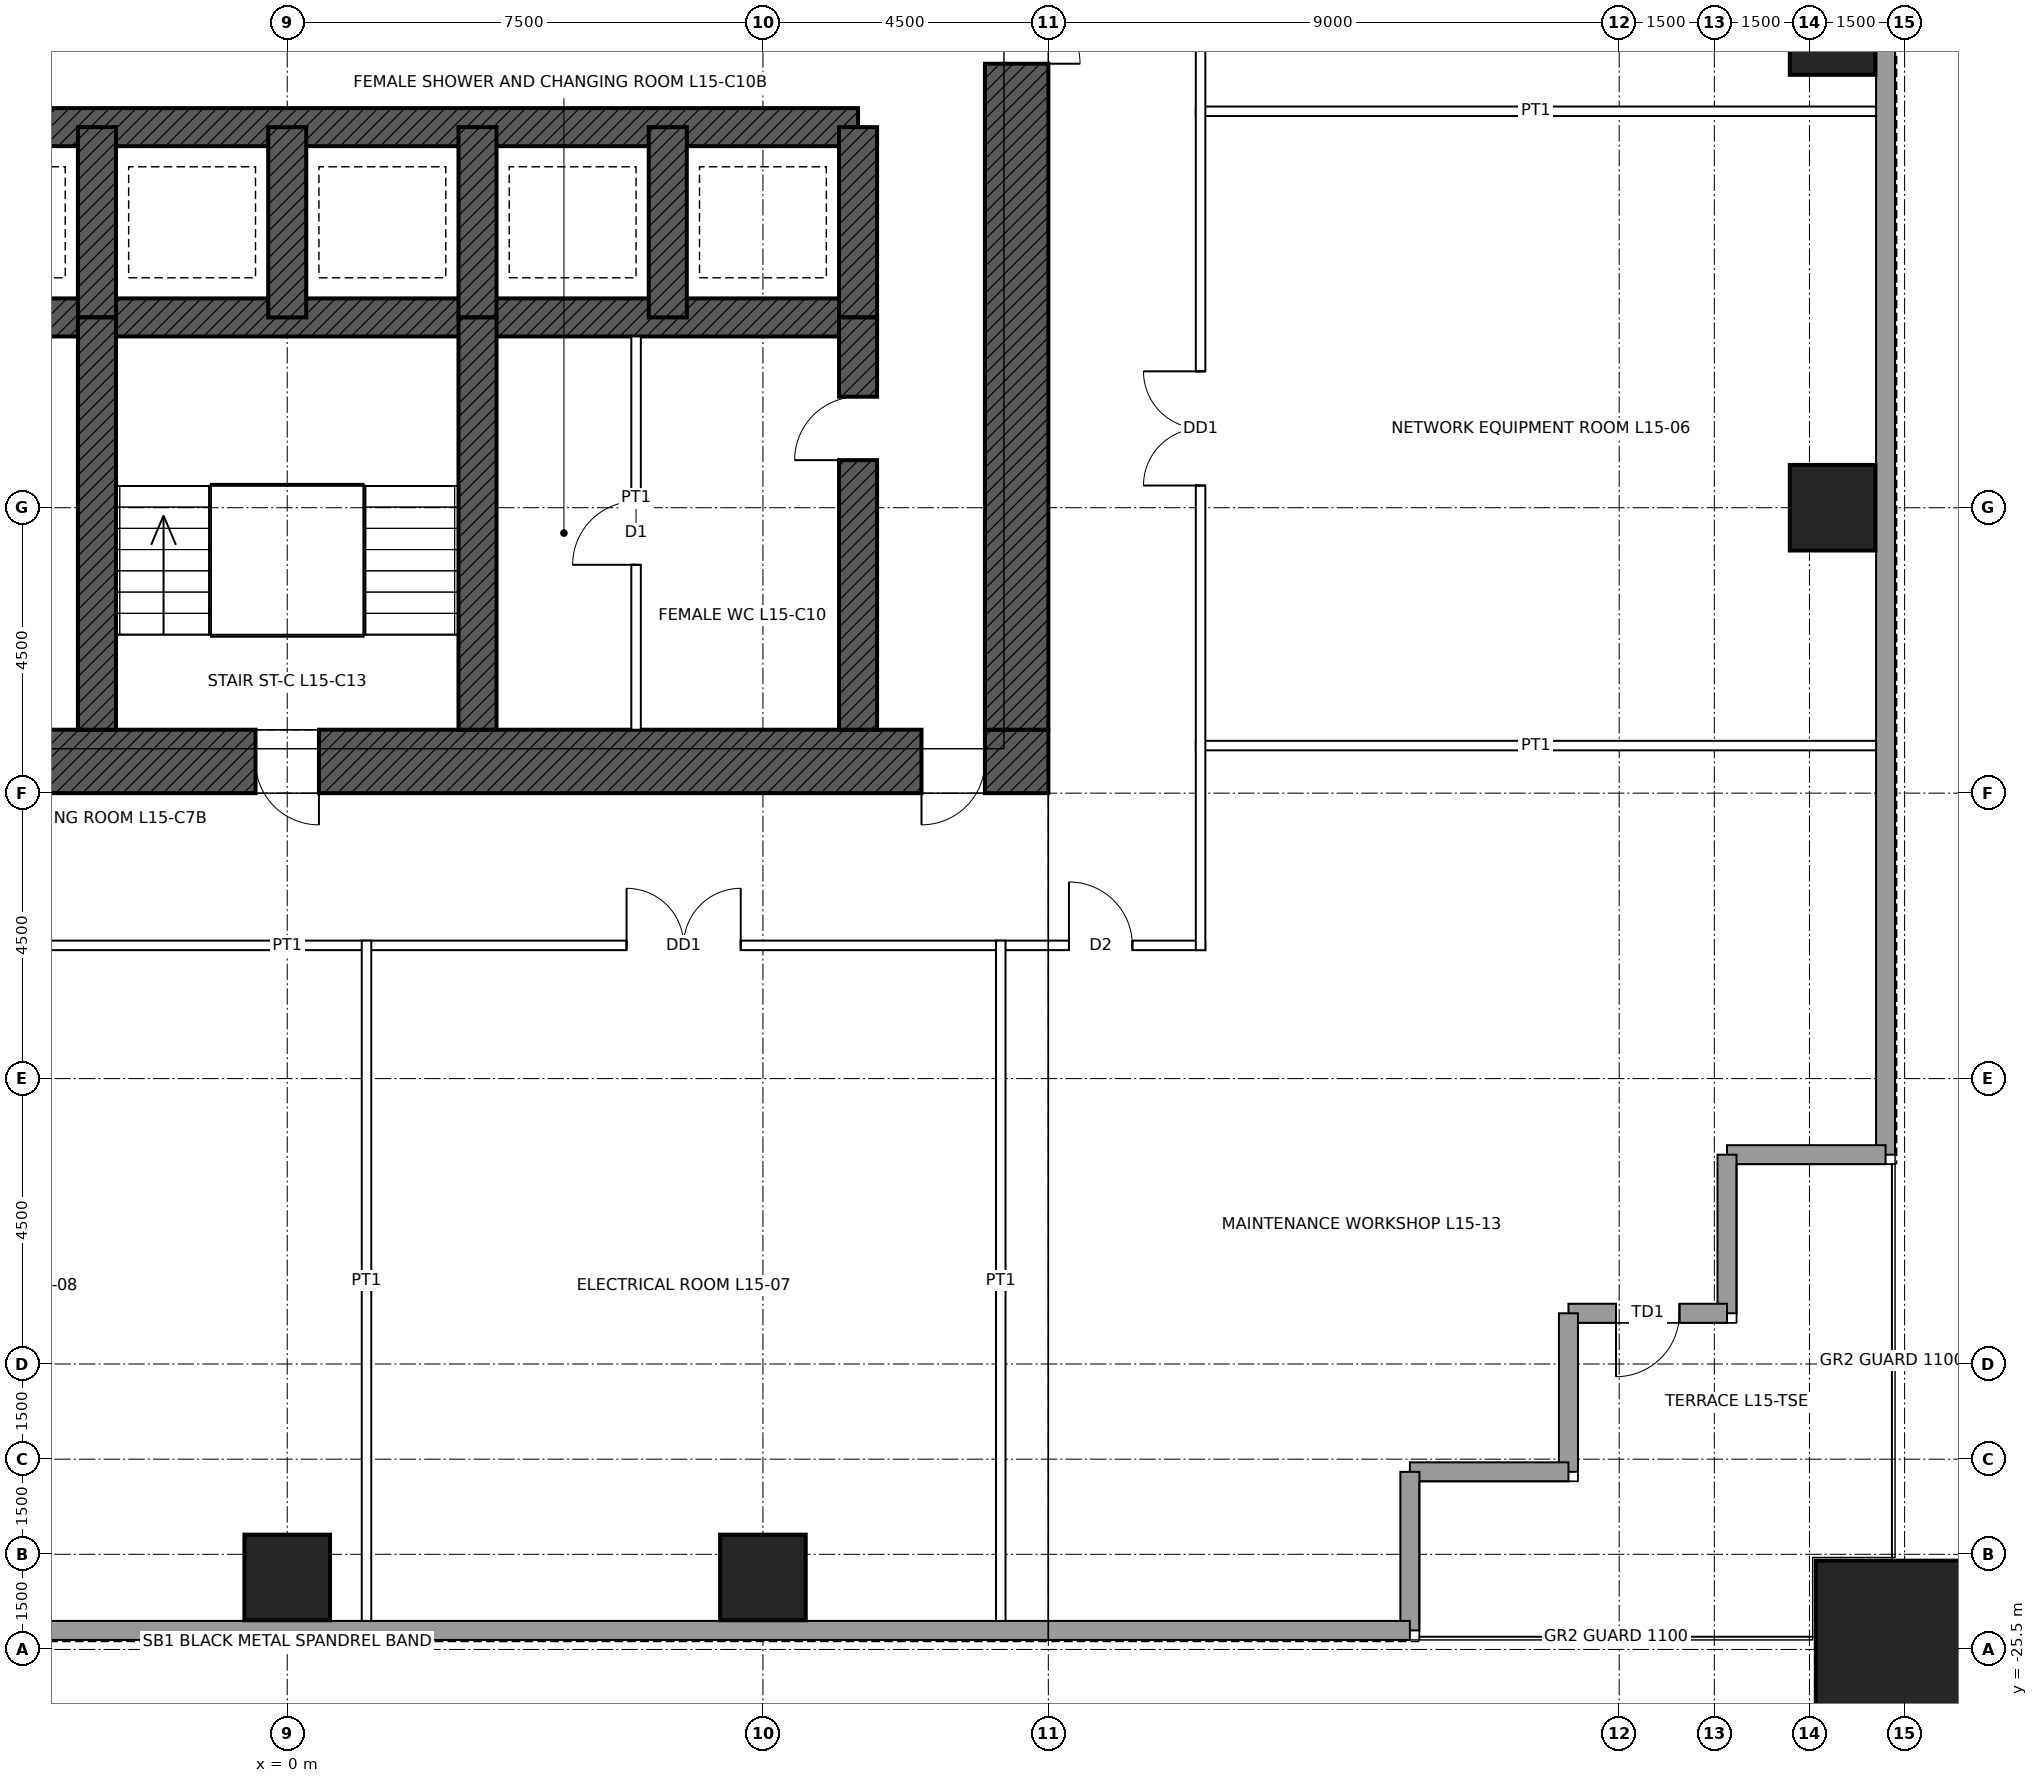
"""IFC4 building model, lengths in metres.
Left out: names, types, materials, properties, quantities, classifications, styles, units other than length and angle.
Written with IfcOpenShell. Run it as: python <this file> out.ifc"""

import sys

from ifc_helpers import new_model, si_unit, direction, frame, frame_2d, origin, origin_2d, place, context, subcontext, project, spatial, rectangle, hollow_rectangle, extrude, element, fill, save


model = new_model("IFC4")
c1 = context("Model", 3, precision=1e-05, world=origin(), true_north=direction((0.0, 1.0)))
c2 = subcontext(c1, "Body", "Model", "MODEL_VIEW")
j1 = project(units=[si_unit("LENGTHUNIT", "METRE"), si_unit("PLANEANGLEUNIT", "RADIAN")], contexts=[c1])
p1 = place(None, origin())
s1 = spatial("IfcSite", under=j1, at=p1, CompositionType="ELEMENT")
p2 = place(p1, origin())
s2 = spatial("IfcBuilding", under=s1, at=p2, CompositionType="ELEMENT")
p3 = place(p2, frame((0.0, 0.0, 78.4)))
s3 = spatial("IfcBuildingStorey", under=s2, at=p3, CompositionType="ELEMENT", Elevation=78.4)
p4 = place(p3, frame((25.5, -25.5, 0.0), z_axis=(0.0, 0.0, 1.0), x_axis=(1.0, 0.0, 0.0)))
e1 = element("IfcColumn", 1, at=p4, inside=s3, PredefinedType="COLUMN", context=c2, shape_type="SweptSolid", body=[
    extrude(hollow_rectangle(XDim=2.8, YDim=2.8, WallThickness=0.14, at=origin_2d()), origin(), (0.0, 0.0, 1.0), 5.0),
])
for number, where, z_axis, x_axis in (
    (2, (24.365, 0.0, 0.0), (0.0, 0.0, 1.0), (1.0, 0.0, 0.0)),
    (3, (24.365, -7.5, 0.0), (0.0, 0.0, 1.0), (1.0, 0.0, 0.0)),
    (4, (7.5, -24.365, 0.0), (0.0, 0.0, 1.0), (1.0, 0.0, 0.0)),
    (5, (0.0, -24.365, 0.0), (0.0, 0.0, 1.0), (1.0, 0.0, 0.0)),
):
    element("IfcColumn", number, at=place(p3, frame(where, z_axis=z_axis, x_axis=x_axis)), inside=s3, PredefinedType="COLUMN", context=c2, shape_type="SweptSolid", body=[
        extrude(hollow_rectangle(XDim=1.35, YDim=1.35, WallThickness=0.085, at=origin_2d()), origin(), (0.0, 0.0, 1.0), 5.0),
    ])
p5 = place(p3, frame((12.0, -11.5, 0.0), z_axis=(0.0, 0.0, 1.0), x_axis=(-1.0, 0.0, 0.0)))
e6 = element("IfcWall", 6, at=p5, inside=s3, PredefinedType="SHEAR", context=c2, shape_type="SweptSolid", body=[
    extrude(rectangle(XDim=24.0, YDim=1.0, at=frame_2d((12.0, 0.0))), origin(), (0.0, 0.0, 1.0), 5.0),
])
p6 = place(p5, frame((11.5, 0.0, 0.0)))
e7 = element("IfcOpeningElement", 7, at=p6, cuts=e6, PredefinedType="OPENING", context=c2, shape_type="SweptSolid", body=[
    extrude(rectangle(XDim=1.0, YDim=2.1, at=frame_2d((0.5, 1.05))), frame((0.0, 0.51, 0.0), z_axis=(0.0, -1.0, 0.0), x_axis=(1.0, 0.0, 0.0)), (0.0, 0.0, 1.0), 1.02),
])
p7 = place(p5, frame((1.0, 0.0, 0.0)))
e8 = element("IfcOpeningElement", 8, at=p7, cuts=e6, PredefinedType="OPENING", context=c2, shape_type="SweptSolid", body=[
    extrude(rectangle(XDim=1.0, YDim=2.4, at=frame_2d((0.5, 1.2))), frame((0.0, 0.51, 0.0), z_axis=(0.0, -1.0, 0.0), x_axis=(1.0, 0.0, 0.0)), (0.0, 0.0, 1.0), 1.02),
])
p8 = place(p3, frame((11.5, 11.0, 0.0), z_axis=(0.0, 0.0, 1.0), x_axis=(0.0, -1.0, 0.0)))
e9 = element("IfcWall", 9, at=p8, inside=s3, PredefinedType="SHEAR", context=c2, shape_type="SweptSolid", body=[
    extrude(rectangle(XDim=22.0, YDim=1.0, at=frame_2d((11.0, 0.0))), origin(), (0.0, 0.0, 1.0), 5.0),
])
p9 = place(p8, frame((10.5, 0.0, 0.0)))
e10 = element("IfcOpeningElement", 10, at=p9, cuts=e9, PredefinedType="OPENING", context=c2, shape_type="SweptSolid", body=[
    extrude(rectangle(XDim=1.0, YDim=2.4, at=frame_2d((0.5, 1.2))), frame((0.0, 0.51, 0.0), z_axis=(0.0, -1.0, 0.0), x_axis=(1.0, 0.0, 0.0)), (0.0, 0.0, 1.0), 1.02),
])
for number, where, z_axis, x_axis in (
    (11, (-9.0, -1.5, 0.0), (0.0, 0.0, 1.0), (1.0, 0.0, 0.0)),
    (12, (-9.0, -4.5, 0.0), (0.0, 0.0, 1.0), (1.0, 0.0, 0.0)),
):
    element("IfcWall", number, at=place(p3, frame(where, z_axis=z_axis, x_axis=x_axis)), inside=s3, PredefinedType="SHEAR", context=c2, shape_type="SweptSolid", body=[
        extrude(rectangle(XDim=18.0, YDim=0.6, at=frame_2d((9.0, 0.0))), origin(), (0.0, 0.0, 1.0), 5.0),
    ])
for number, where, z_axis, x_axis in (
    (13, (9.0, -4.5, 0.0), (0.0, 0.0, 1.0), (0.0, 1.0, 0.0)),
    (14, (-3.0, -4.5, 0.0), (0.0, 0.0, 1.0), (0.0, 1.0, 0.0)),
    (15, (0.0, -4.5, 0.0), (0.0, 0.0, 1.0), (0.0, 1.0, 0.0)),
    (16, (3.0, -4.5, 0.0), (0.0, 0.0, 1.0), (0.0, 1.0, 0.0)),
    (17, (6.0, -4.5, 0.0), (0.0, 0.0, 1.0), (0.0, 1.0, 0.0)),
):
    element("IfcWall", number, at=place(p3, frame(where, z_axis=z_axis, x_axis=x_axis)), inside=s3, PredefinedType="SHEAR", context=c2, shape_type="SweptSolid", body=[
        extrude(rectangle(XDim=3.0, YDim=0.6, at=frame_2d((1.5, 0.0))), origin(), (0.0, 0.0, 1.0), 5.0),
    ])
p10 = place(p3, frame((9.0, -11.0, 0.0), z_axis=(0.0, 0.0, 1.0), x_axis=(0.0, 1.0, 0.0)))
e18 = element("IfcWall", 18, at=p10, inside=s3, PredefinedType="SHEAR", context=c2, shape_type="SweptSolid", body=[
    extrude(rectangle(XDim=6.5, YDim=0.6, at=frame_2d((3.25, 0.0))), origin(), (0.0, 0.0, 1.0), 5.0),
])
p11 = place(p10, frame((4.25, 0.0, 0.0)))
e19 = element("IfcOpeningElement", 19, at=p11, cuts=e18, PredefinedType="OPENING", context=c2, shape_type="SweptSolid", body=[
    extrude(rectangle(XDim=1.0, YDim=2.1, at=frame_2d((0.5, 1.05))), frame((0.0, 0.31, 0.0), z_axis=(0.0, -1.0, 0.0), x_axis=(1.0, 0.0, 0.0)), (0.0, 0.0, 1.0), 0.62),
])
for number, where, z_axis, x_axis in (
    (20, (-3.0, -11.0, 0.0), (0.0, 0.0, 1.0), (0.0, 1.0, 0.0)),
    (21, (3.0, -11.0, 0.0), (0.0, 0.0, 1.0), (0.0, 1.0, 0.0)),
):
    element("IfcWall", number, at=place(p3, frame(where, z_axis=z_axis, x_axis=x_axis)), inside=s3, PredefinedType="SHEAR", context=c2, shape_type="SweptSolid", body=[
        extrude(rectangle(XDim=6.5, YDim=0.6, at=frame_2d((3.25, 0.0))), origin(), (0.0, 0.0, 1.0), 5.0),
    ])
p12 = place(p3, frame((25.2, 17.7, 0.0), z_axis=(0.0, 0.0, 1.0), x_axis=(0.0, -1.0, 0.0)))
e22 = element("IfcWall", 22, at=p12, inside=s3, PredefinedType="SOLIDWALL", context=c2, shape_type="SweptSolid", body=[
    extrude(rectangle(XDim=35.4, YDim=0.3, at=frame_2d((17.7, 0.0))), origin(), (0.0, 0.0, 1.0), 4.8),
])
for number, where, z_axis, x_axis in (
    (23, (25.2, -17.7, 0.0), (0.0, 0.0, 1.0), (-1.0, 0.0, 0.0)),
    (24, (22.7, -17.7, 0.0), (0.0, 0.0, 1.0), (0.0, -1.0, 0.0)),
):
    element("IfcWall", number, at=place(p3, frame(where, z_axis=z_axis, x_axis=x_axis)), inside=s3, PredefinedType="SOLIDWALL", context=c2, shape_type="SweptSolid", body=[
        extrude(rectangle(XDim=2.5, YDim=0.3, at=frame_2d((1.25, 0.0))), origin(), (0.0, 0.0, 1.0), 4.8),
    ])
p13 = place(p3, frame((22.7, -20.2, 0.0), z_axis=(0.0, 0.0, 1.0), x_axis=(-1.0, 0.0, 0.0)))
e25 = element("IfcWall", 25, at=p13, inside=s3, PredefinedType="SOLIDWALL", context=c2, shape_type="SweptSolid", body=[
    extrude(rectangle(XDim=2.5, YDim=0.3, at=frame_2d((1.25, 0.0))), origin(), (0.0, 0.0, 1.0), 4.8),
])
p14 = place(p13, frame((0.75, 0.0, 0.0)))
e26 = element("IfcOpeningElement", 26, at=p14, cuts=e25, PredefinedType="OPENING", context=c2, shape_type="SweptSolid", body=[
    extrude(rectangle(XDim=1.0, YDim=2.4, at=frame_2d((0.5, 1.2))), frame((0.0, 0.16, 0.0), z_axis=(0.0, -1.0, 0.0), x_axis=(1.0, 0.0, 0.0)), (0.0, 0.0, 1.0), 0.32),
])
for number, where, z_axis, x_axis in (
    (27, (20.2, -20.2, 0.0), (0.0, 0.0, 1.0), (0.0, -1.0, 0.0)),
    (28, (20.2, -22.7, 0.0), (0.0, 0.0, 1.0), (-1.0, 0.0, 0.0)),
    (29, (17.7, -22.7, 0.0), (0.0, 0.0, 1.0), (0.0, -1.0, 0.0)),
):
    element("IfcWall", number, at=place(p3, frame(where, z_axis=z_axis, x_axis=x_axis)), inside=s3, PredefinedType="SOLIDWALL", context=c2, shape_type="SweptSolid", body=[
        extrude(rectangle(XDim=2.5, YDim=0.3, at=frame_2d((1.25, 0.0))), origin(), (0.0, 0.0, 1.0), 4.8),
    ])
p15 = place(p3, frame((17.7, -25.2, 0.0), z_axis=(0.0, 0.0, 1.0), x_axis=(-1.0, 0.0, 0.0)))
e30 = element("IfcWall", 30, at=p15, inside=s3, PredefinedType="SOLIDWALL", context=c2, shape_type="SweptSolid", body=[
    extrude(rectangle(XDim=35.4, YDim=0.3, at=frame_2d((17.7, 0.0))), origin(), (0.0, 0.0, 1.0), 4.8),
])
p16 = place(p3, frame((-14.475, -14.4, 0.0), z_axis=(0.0, 0.0, 1.0), x_axis=(1.0, 0.0, 0.0)))
e31 = element("IfcWall", 31, at=p16, inside=s3, PredefinedType="PARTITIONING", context=c2, shape_type="SweptSolid", body=[
    extrude(rectangle(XDim=28.95, YDim=0.15, at=frame_2d((14.475, 0.0))), origin(), (0.0, 0.0, 1.0), 4.8),
])
p17 = place(p16, frame((19.825, 0.0, 0.0)))
e32 = element("IfcOpeningElement", 32, at=p17, cuts=e31, PredefinedType="OPENING", context=c2, shape_type="SweptSolid", body=[
    extrude(rectangle(XDim=1.8, YDim=2.4, at=frame_2d((0.9, 1.2))), frame((0.0, 0.085, 0.0), z_axis=(0.0, -1.0, 0.0), x_axis=(1.0, 0.0, 0.0)), (0.0, 0.0, 1.0), 0.17),
])
p18 = place(p16, frame((8.975, 0.0, 0.0)))
e33 = element("IfcOpeningElement", 33, at=p18, cuts=e31, PredefinedType="OPENING", context=c2, shape_type="SweptSolid", body=[
    extrude(rectangle(XDim=1.0, YDim=2.1, at=frame_2d((0.5, 1.05))), frame((0.0, 0.085, 0.0), z_axis=(0.0, -1.0, 0.0), x_axis=(1.0, 0.0, 0.0)), (0.0, 0.0, 1.0), 0.17),
])
p19 = place(p16, frame((26.8, 0.0, 0.0)))
e34 = element("IfcOpeningElement", 34, at=p19, cuts=e31, PredefinedType="OPENING", context=c2, shape_type="SweptSolid", body=[
    extrude(rectangle(XDim=1.0, YDim=2.1, at=frame_2d((0.5, 1.05))), frame((0.0, 0.085, 0.0), z_axis=(0.0, -1.0, 0.0), x_axis=(1.0, 0.0, 0.0)), (0.0, 0.0, 1.0), 0.17),
])
p20 = place(p16, frame((1.15, 0.0, 0.0)))
e35 = element("IfcOpeningElement", 35, at=p20, cuts=e31, PredefinedType="OPENING", context=c2, shape_type="SweptSolid", body=[
    extrude(rectangle(XDim=1.0, YDim=2.1, at=frame_2d((0.5, 1.05))), frame((0.0, 0.085, 0.0), z_axis=(0.0, -1.0, 0.0), x_axis=(1.0, 0.0, 0.0)), (0.0, 0.0, 1.0), 0.17),
])
p21 = place(p3, frame((14.325, -11.25, 0.0), z_axis=(0.0, 0.0, 1.0), x_axis=(1.0, 0.0, 0.0)))
e36 = element("IfcWall", 36, at=p21, inside=s3, PredefinedType="PARTITIONING", context=c2, shape_type="SweptSolid", body=[
    extrude(rectangle(XDim=10.725, YDim=0.15, at=frame_2d((5.363, 0.0))), origin(), (0.0, 0.0, 1.0), 3.853),
])
for number, where, z_axis, x_axis in (
    (37, (14.325, -1.25, 0.0), (0.0, 0.0, 1.0), (1.0, 0.0, 0.0)),
    (38, (1.25, -25.05, 0.0), (0.0, 0.0, 1.0), (0.0, 1.0, 0.0)),
):
    element("IfcWall", number, at=place(p3, frame(where, z_axis=z_axis, x_axis=x_axis)), inside=s3, PredefinedType="PARTITIONING", context=c2, shape_type="SweptSolid", body=[
        extrude(rectangle(XDim=10.725, YDim=0.15, at=frame_2d((5.363, 0.0))), origin(), (0.0, 0.0, 1.0), 4.8),
    ])
p22 = place(p3, frame((11.25, -25.05, 0.0), z_axis=(0.0, 0.0, 1.0), x_axis=(0.0, 1.0, 0.0)))
e39 = element("IfcWall", 39, at=p22, inside=s3, PredefinedType="PARTITIONING", context=c2, shape_type="SweptSolid", body=[
    extrude(rectangle(XDim=10.725, YDim=0.15, at=frame_2d((5.363, 0.0))), origin(), (0.0, 0.0, 1.0), 3.853),
])
p23 = place(p3, frame((14.4, -14.475, 0.0), z_axis=(0.0, 0.0, 1.0), x_axis=(0.0, 1.0, 0.0)))
e40 = element("IfcWall", 40, at=p23, inside=s3, PredefinedType="PARTITIONING", context=c2, shape_type="SweptSolid", body=[
    extrude(rectangle(XDim=28.95, YDim=0.15, at=frame_2d((14.475, 0.0))), origin(), (0.0, 0.0, 1.0), 4.8),
])
p24 = place(p23, frame((18.575, 0.0, 0.0)))
e41 = element("IfcOpeningElement", 41, at=p24, cuts=e40, PredefinedType="OPENING", context=c2, shape_type="SweptSolid", body=[
    extrude(rectangle(XDim=1.8, YDim=2.4, at=frame_2d((0.9, 1.2))), frame((0.0, 0.085, 0.0), z_axis=(0.0, -1.0, 0.0), x_axis=(1.0, 0.0, 0.0)), (0.0, 0.0, 1.0), 0.17),
])
p25 = place(p23, frame((7.325, 0.0, 0.0)))
e42 = element("IfcOpeningElement", 42, at=p25, cuts=e40, PredefinedType="OPENING", context=c2, shape_type="SweptSolid", body=[
    extrude(rectangle(XDim=1.8, YDim=2.4, at=frame_2d((0.9, 1.2))), frame((0.0, 0.085, 0.0), z_axis=(0.0, -1.0, 0.0), x_axis=(1.0, 0.0, 0.0)), (0.0, 0.0, 1.0), 0.17),
])
p26 = place(p3, frame((5.5, -11.0, 0.0), z_axis=(0.0, 0.0, 1.0), x_axis=(0.0, 1.0, 0.0)))
e43 = element("IfcWall", 43, at=p26, inside=s3, PredefinedType="PARTITIONING", context=c2, shape_type="SweptSolid", body=[
    extrude(rectangle(XDim=6.2, YDim=0.15, at=frame_2d((3.1, 0.0))), origin(), (0.0, 0.0, 1.0), 4.75),
])
p27 = place(p26, frame((2.6, 0.0, 0.0)))
e44 = element("IfcOpeningElement", 44, at=p27, cuts=e43, PredefinedType="OPENING", context=c2, shape_type="SweptSolid", body=[
    extrude(rectangle(XDim=1.0, YDim=2.1, at=frame_2d((0.5, 1.05))), frame((0.0, 0.085, 0.0), z_axis=(0.0, -1.0, 0.0), x_axis=(1.0, 0.0, 0.0)), (0.0, 0.0, 1.0), 0.17),
])
p28 = place(p14, origin())
e45 = element("IfcDoor", 45, at=p28, inside=s3, OperationType="SINGLE_SWING_RIGHT", PredefinedType="DOOR", context=c2, shape_type="SweptSolid", body=[
    extrude(rectangle(XDim=1.0, YDim=2.4, at=frame_2d((0.5, 1.2))), frame((0.0, 0.025, 0.0), z_axis=(0.0, -1.0, 0.0), x_axis=(1.0, 0.0, 0.0)), (0.0, 0.0, 1.0), 0.05),
])
fill(e26, e45)
p29 = place(p6, origin())
e46 = element("IfcDoor", 46, at=p29, inside=s3, OperationType="SINGLE_SWING_LEFT", PredefinedType="DOOR", context=c2, shape_type="SweptSolid", body=[
    extrude(rectangle(XDim=1.0, YDim=2.1, at=frame_2d((0.5, 1.05))), frame((0.0, 0.485, 0.0), z_axis=(0.0, -1.0, 0.0), x_axis=(1.0, 0.0, 0.0)), (0.0, 0.0, 1.0), 0.05),
])
fill(e7, e46)
p30 = place(p9, origin())
e47 = element("IfcDoor", 47, at=p30, inside=s3, OperationType="SINGLE_SWING_RIGHT", PredefinedType="DOOR", context=c2, shape_type="SweptSolid", body=[
    extrude(rectangle(XDim=1.0, YDim=2.4, at=frame_2d((0.5, 1.2))), frame((0.0, 0.485, 0.0), z_axis=(0.0, -1.0, 0.0), x_axis=(1.0, 0.0, 0.0)), (0.0, 0.0, 1.0), 0.05),
])
fill(e10, e47)
p31 = place(p7, origin())
e48 = element("IfcDoor", 48, at=p31, inside=s3, OperationType="SINGLE_SWING_RIGHT", PredefinedType="DOOR", context=c2, shape_type="SweptSolid", body=[
    extrude(rectangle(XDim=1.0, YDim=2.4, at=frame_2d((0.5, 1.2))), frame((0.0, 0.485, 0.0), z_axis=(0.0, -1.0, 0.0), x_axis=(1.0, 0.0, 0.0)), (0.0, 0.0, 1.0), 0.05),
])
fill(e8, e48)
p32 = place(p11, origin())
e49 = element("IfcDoor", 49, at=p32, inside=s3, OperationType="SINGLE_SWING_LEFT", PredefinedType="DOOR", context=c2, shape_type="SweptSolid", body=[
    extrude(rectangle(XDim=1.0, YDim=2.1, at=frame_2d((0.5, 1.05))), frame((0.0, 0.025, 0.0), z_axis=(0.0, -1.0, 0.0), x_axis=(1.0, 0.0, 0.0)), (0.0, 0.0, 1.0), 0.05),
])
fill(e19, e49)
p33 = place(p27, origin())
e50 = element("IfcDoor", 50, at=p33, inside=s3, OperationType="SINGLE_SWING_LEFT", PredefinedType="DOOR", context=c2, shape_type="SweptSolid", body=[
    extrude(rectangle(XDim=1.0, YDim=2.1, at=frame_2d((0.5, 1.05))), frame((0.0, 0.025, 0.0), z_axis=(0.0, -1.0, 0.0), x_axis=(1.0, 0.0, 0.0)), (0.0, 0.0, 1.0), 0.05),
])
fill(e44, e50)
p34 = place(p25, origin())
e51 = element("IfcDoor", 51, at=p34, inside=s3, OperationType="DOUBLE_DOOR_SINGLE_SWING", PredefinedType="DOOR", context=c2, shape_type="SweptSolid", body=[
    extrude(rectangle(XDim=1.8, YDim=2.4, at=frame_2d((0.9, 1.2))), frame((0.0, 0.025, 0.0), z_axis=(0.0, -1.0, 0.0), x_axis=(1.0, 0.0, 0.0)), (0.0, 0.0, 1.0), 0.05),
])
fill(e42, e51)
p35 = place(p17, origin())
e52 = element("IfcDoor", 52, at=p35, inside=s3, OperationType="DOUBLE_DOOR_SINGLE_SWING", PredefinedType="DOOR", context=c2, shape_type="SweptSolid", body=[
    extrude(rectangle(XDim=1.8, YDim=2.4, at=frame_2d((0.9, 1.2))), frame((0.0, 0.025, 0.0), z_axis=(0.0, -1.0, 0.0), x_axis=(1.0, 0.0, 0.0)), (0.0, 0.0, 1.0), 0.05),
])
fill(e32, e52)
p36 = place(p19, origin())
e53 = element("IfcDoor", 53, at=p36, inside=s3, OperationType="SINGLE_SWING_LEFT", PredefinedType="DOOR", context=c2, shape_type="SweptSolid", body=[
    extrude(rectangle(XDim=1.0, YDim=2.1, at=frame_2d((0.5, 1.05))), frame((0.0, 0.025, 0.0), z_axis=(0.0, -1.0, 0.0), x_axis=(1.0, 0.0, 0.0)), (0.0, 0.0, 1.0), 0.05),
])
fill(e34, e53)
save(model, sys.argv[1])
